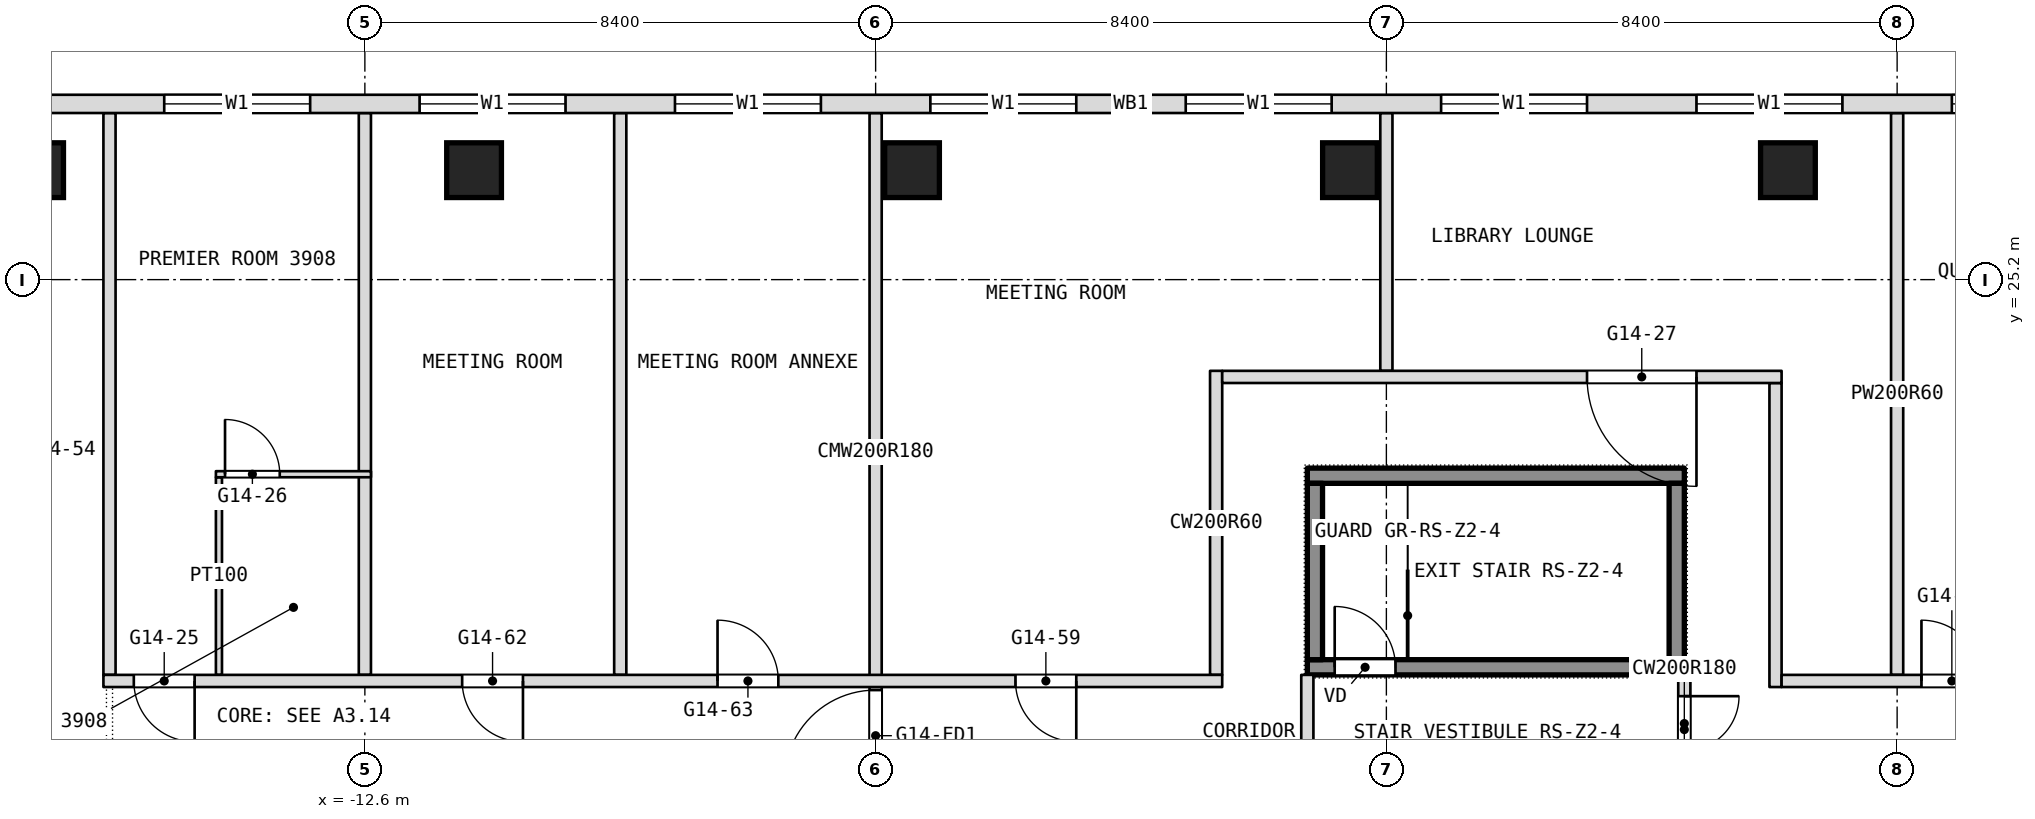
"""IFC4 building model, lengths in metres.
Left out: names, types, materials, properties, quantities, classifications, styles, units other than length and angle.
Written with IfcOpenShell. Run it as: python <this file> out.ifc"""

import sys

from ifc_helpers import new_model, si_unit, direction, frame, frame_2d, origin, origin_2d, place, context, subcontext, project, spatial, rectangle, extrude, element, fill, save


model = new_model("IFC4")
c1 = context("Model", 3, precision=1e-05, world=origin(), true_north=direction((0.0, 1.0)))
c2 = subcontext(c1, "Body", "Model", "MODEL_VIEW")
j1 = project(units=[si_unit("LENGTHUNIT", "METRE"), si_unit("PLANEANGLEUNIT", "RADIAN")], contexts=[c1])
p1 = place(None, origin())
s1 = spatial("IfcSite", under=j1, at=p1, CompositionType="ELEMENT")
p2 = place(p1, origin())
s2 = spatial("IfcBuilding", under=s1, at=p2, CompositionType="ELEMENT")
p3 = place(p2, frame((0.0, 0.0, 166.1)))
s3 = spatial("IfcBuildingStorey", under=s2, at=p3, CompositionType="ELEMENT", Elevation=166.1)
for number, where, z_axis, x_axis in (
    (1, (-18.007, 27.0, 0.0), (0.0, 0.0, 1.0), (1.0, 0.0, 0.0)),
    (2, (-10.804, 27.0, 0.0), (0.0, 0.0, 1.0), (1.0, 0.0, 0.0)),
    (3, (-3.601, 27.0, 0.0), (0.0, 0.0, 1.0), (1.0, 0.0, 0.0)),
    (4, (3.601, 27.0, 0.0), (0.0, 0.0, 1.0), (1.0, 0.0, 0.0)),
    (5, (10.804, 27.0, 0.0), (0.0, 0.0, 1.0), (1.0, 0.0, 0.0)),
):
    element("IfcColumn", number, at=place(p3, frame(where, z_axis=z_axis, x_axis=x_axis)), inside=s3, PredefinedType="COLUMN", context=c2, shape_type="SweptSolid", body=[
        extrude(rectangle(XDim=0.9, YDim=0.9, at=origin_2d()), origin(), (0.0, 0.0, 1.0), 3.6),
    ])
p4 = place(p3, frame((12.6, 18.7, 0.0), z_axis=(0.0, 0.0, 1.0), x_axis=(0.0, 1.0, 0.0)))
e6 = element("IfcWall", 6, at=p4, inside=s3, PredefinedType="PARTITIONING", context=c2, shape_type="SweptSolid", body=[
    extrude(rectangle(XDim=9.24, YDim=0.2, at=frame_2d((4.62, 0.0))), origin(), (0.0, 0.0, 1.0), 3.3),
])
p5 = place(p3, frame((10.6, 18.5, 0.0), z_axis=(0.0, 0.0, 1.0), x_axis=(0.0, 1.0, 0.0)))
e7 = element("IfcWall", 7, at=p5, inside=s3, PredefinedType="PARTITIONING", context=c2, shape_type="SweptSolid", body=[
    extrude(rectangle(XDim=5.0, YDim=0.2, at=frame_2d((2.5, 0.0))), origin(), (0.0, 0.0, 1.0), 3.3),
])
p6 = place(p3, frame((9.1, 16.9, 0.0), z_axis=(0.0, 0.0, 1.0), x_axis=(0.0, 1.0, 0.0)))
e8 = element("IfcWall", 8, at=p6, inside=s3, PredefinedType="PARTITIONING", context=c2, shape_type="SweptSolid", body=[
    extrude(rectangle(XDim=1.8, YDim=0.2, at=frame_2d((0.9, 0.0))), origin(), (0.0, 0.0, 1.0), 3.3),
])
p7 = place(p6, frame((0.55, 0.0, 0.0)))
e9 = element("IfcOpeningElement", 9, at=p7, cuts=e8, PredefinedType="OPENING", context=c2, shape_type="SweptSolid", body=[
    extrude(rectangle(XDim=0.9, YDim=2.1, at=frame_2d((0.45, 1.05))), frame((0.0, 0.1, 0.0), z_axis=(0.0, -1.0, 0.0), x_axis=(1.0, 0.0, 0.0)), (0.0, 0.0, 1.0), 0.2),
])
p8 = place(p3, frame((4.2, 23.7, 0.0), z_axis=(0.0, 0.0, 1.0), x_axis=(0.0, 1.0, 0.0)))
e10 = element("IfcWall", 10, at=p8, inside=s3, PredefinedType="PARTITIONING", context=c2, shape_type="SweptSolid", body=[
    extrude(rectangle(XDim=4.24, YDim=0.2, at=frame_2d((2.12, 0.0))), origin(), (0.0, 0.0, 1.0), 3.3),
])
p9 = place(p3, frame((2.9, 16.9, 0.0), z_axis=(0.0, 0.0, 1.0), x_axis=(0.0, 1.0, 0.0)))
e11 = element("IfcWall", 11, at=p9, inside=s3, PredefinedType="PARTITIONING", context=c2, shape_type="SweptSolid", body=[
    extrude(rectangle(XDim=1.8, YDim=0.2, at=frame_2d((0.9, 0.0))), origin(), (0.0, 0.0, 1.0), 3.3),
])
p10 = place(p3, frame((1.4, 18.7, 0.0), z_axis=(0.0, 0.0, 1.0), x_axis=(0.0, 1.0, 0.0)))
e12 = element("IfcWall", 12, at=p10, inside=s3, PredefinedType="PARTITIONING", context=c2, shape_type="SweptSolid", body=[
    extrude(rectangle(XDim=5.0, YDim=0.2, at=frame_2d((2.5, 0.0))), origin(), (0.0, 0.0, 1.0), 3.3),
])
p11 = place(p3, frame((-4.2, 16.8, 0.0), z_axis=(0.0, 0.0, 1.0), x_axis=(0.0, 1.0, 0.0)))
e13 = element("IfcWall", 13, at=p11, inside=s3, PredefinedType="PARTITIONING", context=c2, shape_type="SweptSolid", body=[
    extrude(rectangle(XDim=11.14, YDim=0.2, at=frame_2d((5.57, 0.0))), origin(), (0.0, 0.0, 1.0), 3.3),
])
p12 = place(p11, frame((0.15, 0.0, 0.0)))
e14 = element("IfcOpeningElement", 14, at=p12, cuts=e13, PredefinedType="OPENING", context=c2, shape_type="SweptSolid", body=[
    extrude(rectangle(XDim=1.5, YDim=2.1, at=frame_2d((0.75, 1.05))), frame((0.0, 0.1, 0.0), z_axis=(0.0, -1.0, 0.0), x_axis=(1.0, 0.0, 0.0)), (0.0, 0.0, 1.0), 0.2),
])
for number, where, z_axis, x_axis in (
    (15, (-8.4, 18.7, 0.0), (0.0, 0.0, 1.0), (0.0, 1.0, 0.0)),
    (16, (-12.6, 18.7, 0.0), (0.0, 0.0, 1.0), (0.0, 1.0, 0.0)),
):
    element("IfcWall", number, at=place(p3, frame(where, z_axis=z_axis, x_axis=x_axis)), inside=s3, PredefinedType="PARTITIONING", context=c2, shape_type="SweptSolid", body=[
        extrude(rectangle(XDim=9.24, YDim=0.2, at=frame_2d((4.62, 0.0))), origin(), (0.0, 0.0, 1.0), 3.3),
    ])
p13 = place(p3, frame((-15.0, 18.7, 0.0), z_axis=(0.0, 0.0, 1.0), x_axis=(0.0, 1.0, 0.0)))
e17 = element("IfcWall", 17, at=p13, inside=s3, PredefinedType="PARTITIONING", context=c2, shape_type="SweptSolid", body=[
    extrude(rectangle(XDim=3.25, YDim=0.1, at=frame_2d((1.625, 0.0))), origin(), (0.0, 0.0, 1.0), 3.3),
])
p14 = place(p3, frame((-16.8, 18.7, 0.0), z_axis=(0.0, 0.0, 1.0), x_axis=(0.0, 1.0, 0.0)))
e18 = element("IfcWall", 18, at=p14, inside=s3, PredefinedType="PARTITIONING", context=c2, shape_type="SweptSolid", body=[
    extrude(rectangle(XDim=9.24, YDim=0.2, at=frame_2d((4.62, 0.0))), origin(), (0.0, 0.0, 1.0), 3.3),
])
p15 = place(p3, frame((-16.9, 18.6, 0.0), z_axis=(0.0, 0.0, 1.0), x_axis=(1.0, 0.0, 0.0)))
e19 = element("IfcWall", 19, at=p15, inside=s3, PredefinedType="PARTITIONING", context=c2, shape_type="SweptSolid", body=[
    extrude(rectangle(XDim=18.4, YDim=0.2, at=frame_2d((9.2, 0.0))), origin(), (0.0, 0.0, 1.0), 3.3),
])
p16 = place(p15, frame((0.5, 0.0, 0.0)))
e20 = element("IfcOpeningElement", 20, at=p16, cuts=e19, PredefinedType="OPENING", context=c2, shape_type="SweptSolid", body=[
    extrude(rectangle(XDim=1.0, YDim=2.1, at=frame_2d((0.5, 1.05))), frame((0.0, 0.1, 0.0), z_axis=(0.0, -1.0, 0.0), x_axis=(1.0, 0.0, 0.0)), (0.0, 0.0, 1.0), 0.2),
])
p17 = place(p15, frame((15.0, 0.0, 0.0)))
e21 = element("IfcOpeningElement", 21, at=p17, cuts=e19, PredefinedType="OPENING", context=c2, shape_type="SweptSolid", body=[
    extrude(rectangle(XDim=1.0, YDim=2.1, at=frame_2d((0.5, 1.05))), frame((0.0, 0.1, 0.0), z_axis=(0.0, -1.0, 0.0), x_axis=(1.0, 0.0, 0.0)), (0.0, 0.0, 1.0), 0.2),
])
p18 = place(p15, frame((5.9, 0.0, 0.0)))
e22 = element("IfcOpeningElement", 22, at=p18, cuts=e19, PredefinedType="OPENING", context=c2, shape_type="SweptSolid", body=[
    extrude(rectangle(XDim=1.0, YDim=2.1, at=frame_2d((0.5, 1.05))), frame((0.0, 0.1, 0.0), z_axis=(0.0, -1.0, 0.0), x_axis=(1.0, 0.0, 0.0)), (0.0, 0.0, 1.0), 0.2),
])
p19 = place(p15, frame((10.1, 0.0, 0.0)))
e23 = element("IfcOpeningElement", 23, at=p19, cuts=e19, PredefinedType="OPENING", context=c2, shape_type="SweptSolid", body=[
    extrude(rectangle(XDim=1.0, YDim=2.1, at=frame_2d((0.5, 1.05))), frame((0.0, 0.1, 0.0), z_axis=(0.0, -1.0, 0.0), x_axis=(1.0, 0.0, 0.0)), (0.0, 0.0, 1.0), 0.2),
])
p20 = place(p3, frame((10.7, 18.6, 0.0), z_axis=(0.0, 0.0, 1.0), x_axis=(1.0, 0.0, 0.0)))
e24 = element("IfcWall", 24, at=p20, inside=s3, PredefinedType="PARTITIONING", context=c2, shape_type="SweptSolid", body=[
    extrude(rectangle(XDim=6.2, YDim=0.2, at=frame_2d((3.1, 0.0))), origin(), (0.0, 0.0, 1.0), 3.3),
])
p21 = place(p20, frame((2.3, 0.0, 0.0)))
e25 = element("IfcOpeningElement", 25, at=p21, cuts=e24, PredefinedType="OPENING", context=c2, shape_type="SweptSolid", body=[
    extrude(rectangle(XDim=1.0, YDim=2.1, at=frame_2d((0.5, 1.05))), frame((0.0, 0.1, 0.0), z_axis=(0.0, -1.0, 0.0), x_axis=(1.0, 0.0, 0.0)), (0.0, 0.0, 1.0), 0.2),
])
p22 = place(p3, frame((-15.05, 22.0, 0.0), z_axis=(0.0, 0.0, 1.0), x_axis=(1.0, 0.0, 0.0)))
e26 = element("IfcWall", 26, at=p22, inside=s3, PredefinedType="PARTITIONING", context=c2, shape_type="SweptSolid", body=[
    extrude(rectangle(XDim=2.55, YDim=0.1, at=frame_2d((1.275, 0.0))), origin(), (0.0, 0.0, 1.0), 3.3),
])
p23 = place(p22, frame((0.15, 0.0, 0.0)))
e27 = element("IfcOpeningElement", 27, at=p23, cuts=e26, PredefinedType="OPENING", context=c2, shape_type="SweptSolid", body=[
    extrude(rectangle(XDim=0.9, YDim=2.1, at=frame_2d((0.45, 1.05))), frame((0.0, 0.05, 0.0), z_axis=(0.0, -1.0, 0.0), x_axis=(1.0, 0.0, 0.0)), (0.0, 0.0, 1.0), 0.1),
])
p24 = place(p3, frame((1.5, 23.6, 0.0), z_axis=(0.0, 0.0, 1.0), x_axis=(1.0, 0.0, 0.0)))
e28 = element("IfcWall", 28, at=p24, inside=s3, PredefinedType="PARTITIONING", context=c2, shape_type="SweptSolid", body=[
    extrude(rectangle(XDim=9.2, YDim=0.2, at=frame_2d((4.6, 0.0))), origin(), (0.0, 0.0, 1.0), 3.3),
])
p25 = place(p24, frame((6.0, 0.0, 0.0)))
e29 = element("IfcOpeningElement", 29, at=p25, cuts=e28, PredefinedType="OPENING", context=c2, shape_type="SweptSolid", body=[
    extrude(rectangle(XDim=1.8, YDim=2.1, at=frame_2d((0.9, 1.05))), frame((0.0, 0.1, 0.0), z_axis=(0.0, -1.0, 0.0), x_axis=(1.0, 0.0, 0.0)), (0.0, 0.0, 1.0), 0.2),
])
p26 = place(p3, frame((21.306, 28.09, 0.0), z_axis=(0.0, 0.0, 1.0), x_axis=(-1.0, 0.0, 0.0)))
e30 = element("IfcWall", 30, at=p26, inside=s3, PredefinedType="NOTDEFINED", context=c2, shape_type="SweptSolid", body=[
    extrude(rectangle(XDim=42.612, YDim=0.3, at=frame_2d((21.306, 0.0))), origin(), (0.0, 0.0, 1.0), 3.6),
])
p27 = place(p26, frame((5.406, 0.0, 0.9)))
e31 = element("IfcOpeningElement", 31, at=p27, cuts=e30, PredefinedType="OPENING", context=c2, shape_type="SweptSolid", body=[
    extrude(rectangle(XDim=2.4, YDim=2.1, at=frame_2d((1.2, 1.05))), frame((0.0, 0.15, 0.0), z_axis=(0.0, -1.0, 0.0), x_axis=(1.0, 0.0, 0.0)), (0.0, 0.0, 1.0), 0.3),
])
p28 = place(p26, frame((9.606, 0.0, 0.9)))
e32 = element("IfcOpeningElement", 32, at=p28, cuts=e30, PredefinedType="OPENING", context=c2, shape_type="SweptSolid", body=[
    extrude(rectangle(XDim=2.4, YDim=2.1, at=frame_2d((1.2, 1.05))), frame((0.0, 0.15, 0.0), z_axis=(0.0, -1.0, 0.0), x_axis=(1.0, 0.0, 0.0)), (0.0, 0.0, 1.0), 0.3),
])
p29 = place(p26, frame((13.806, 0.0, 0.9)))
e33 = element("IfcOpeningElement", 33, at=p29, cuts=e30, PredefinedType="OPENING", context=c2, shape_type="SweptSolid", body=[
    extrude(rectangle(XDim=2.4, YDim=2.1, at=frame_2d((1.2, 1.05))), frame((0.0, 0.15, 0.0), z_axis=(0.0, -1.0, 0.0), x_axis=(1.0, 0.0, 0.0)), (0.0, 0.0, 1.0), 0.3),
])
p30 = place(p26, frame((18.006, 0.0, 0.9)))
e34 = element("IfcOpeningElement", 34, at=p30, cuts=e30, PredefinedType="OPENING", context=c2, shape_type="SweptSolid", body=[
    extrude(rectangle(XDim=2.4, YDim=2.1, at=frame_2d((1.2, 1.05))), frame((0.0, 0.15, 0.0), z_axis=(0.0, -1.0, 0.0), x_axis=(1.0, 0.0, 0.0)), (0.0, 0.0, 1.0), 0.3),
])
p31 = place(p26, frame((22.206, 0.0, 0.9)))
e35 = element("IfcOpeningElement", 35, at=p31, cuts=e30, PredefinedType="OPENING", context=c2, shape_type="SweptSolid", body=[
    extrude(rectangle(XDim=2.4, YDim=2.1, at=frame_2d((1.2, 1.05))), frame((0.0, 0.15, 0.0), z_axis=(0.0, -1.0, 0.0), x_axis=(1.0, 0.0, 0.0)), (0.0, 0.0, 1.0), 0.3),
])
p32 = place(p26, frame((26.406, 0.0, 0.9)))
e36 = element("IfcOpeningElement", 36, at=p32, cuts=e30, PredefinedType="OPENING", context=c2, shape_type="SweptSolid", body=[
    extrude(rectangle(XDim=2.4, YDim=2.1, at=frame_2d((1.2, 1.05))), frame((0.0, 0.15, 0.0), z_axis=(0.0, -1.0, 0.0), x_axis=(1.0, 0.0, 0.0)), (0.0, 0.0, 1.0), 0.3),
])
p33 = place(p26, frame((30.606, 0.0, 0.9)))
e37 = element("IfcOpeningElement", 37, at=p33, cuts=e30, PredefinedType="OPENING", context=c2, shape_type="SweptSolid", body=[
    extrude(rectangle(XDim=2.4, YDim=2.1, at=frame_2d((1.2, 1.05))), frame((0.0, 0.15, 0.0), z_axis=(0.0, -1.0, 0.0), x_axis=(1.0, 0.0, 0.0)), (0.0, 0.0, 1.0), 0.3),
])
p34 = place(p26, frame((34.806, 0.0, 0.9)))
e38 = element("IfcOpeningElement", 38, at=p34, cuts=e30, PredefinedType="OPENING", context=c2, shape_type="SweptSolid", body=[
    extrude(rectangle(XDim=2.4, YDim=2.1, at=frame_2d((1.2, 1.05))), frame((0.0, 0.15, 0.0), z_axis=(0.0, -1.0, 0.0), x_axis=(1.0, 0.0, 0.0)), (0.0, 0.0, 1.0), 0.3),
])
p35 = place(p3, frame((2.9, 18.825, 0.1), z_axis=(0.0, 0.0, 1.0), x_axis=(1.0, 0.0, 0.0)))
e39 = element("IfcWall", 39, at=p35, inside=s3, PredefinedType="SHEAR", context=c2, shape_type="SweptSolid", body=[
    extrude(rectangle(XDim=6.2, YDim=0.25, at=frame_2d((3.1, 0.0))), origin(), (0.0, 0.0, 1.0), 3.2),
])
p36 = place(p35, frame((0.45, 0.0, 0.0)))
e40 = element("IfcOpeningElement", 40, at=p36, cuts=e39, PredefinedType="OPENING", context=c2, shape_type="SweptSolid", body=[
    extrude(rectangle(XDim=1.0, YDim=2.1, at=frame_2d((0.5, 1.05))), frame((0.0, 0.125, 0.0), z_axis=(0.0, -1.0, 0.0), x_axis=(1.0, 0.0, 0.0)), (0.0, 0.0, 1.0), 0.25),
])
p37 = place(p3, frame((2.9, 21.975, 0.1), z_axis=(0.0, 0.0, 1.0), x_axis=(1.0, 0.0, 0.0)))
e41 = element("IfcWall", 41, at=p37, inside=s3, PredefinedType="SHEAR", context=c2, shape_type="SweptSolid", body=[
    extrude(rectangle(XDim=6.2, YDim=0.25, at=frame_2d((3.1, 0.0))), origin(), (0.0, 0.0, 1.0), 3.2),
])
for number, where, z_axis, x_axis in (
    (42, (3.025, 18.95, 0.1), (0.0, 0.0, 1.0), (0.0, 1.0, 0.0)),
    (43, (8.975, 18.95, 0.1), (0.0, 0.0, 1.0), (0.0, 1.0, 0.0)),
):
    element("IfcWall", number, at=place(p3, frame(where, z_axis=z_axis, x_axis=x_axis)), inside=s3, PredefinedType="SHEAR", context=c2, shape_type="SweptSolid", body=[
        extrude(rectangle(XDim=2.9, YDim=0.25, at=frame_2d((1.45, 0.0))), origin(), (0.0, 0.0, 1.0), 3.2),
    ])
p38 = place(p7, origin())
e44 = element("IfcDoor", 44, at=p38, inside=s3, OperationType="SINGLE_SWING_RIGHT", PredefinedType="DOOR", context=c2, shape_type="SweptSolid", body=[
    extrude(rectangle(XDim=0.9, YDim=2.1, at=frame_2d((0.45, 1.05))), frame((0.0, 0.025, 0.0), z_axis=(0.0, -1.0, 0.0), x_axis=(1.0, 0.0, 0.0)), (0.0, 0.0, 1.0), 0.05),
])
fill(e9, e44)
p39 = place(p16, origin())
e45 = element("IfcDoor", 45, at=p39, inside=s3, OperationType="SINGLE_SWING_RIGHT", PredefinedType="DOOR", context=c2, shape_type="SweptSolid", body=[
    extrude(rectangle(XDim=1.0, YDim=2.1, at=frame_2d((0.5, 1.05))), frame((0.0, 0.025, 0.0), z_axis=(0.0, -1.0, 0.0), x_axis=(1.0, 0.0, 0.0)), (0.0, 0.0, 1.0), 0.05),
])
fill(e20, e45)
p40 = place(p17, origin())
e46 = element("IfcDoor", 46, at=p40, inside=s3, OperationType="SINGLE_SWING_RIGHT", PredefinedType="DOOR", context=c2, shape_type="SweptSolid", body=[
    extrude(rectangle(XDim=1.0, YDim=2.1, at=frame_2d((0.5, 1.05))), frame((0.0, 0.025, 0.0), z_axis=(0.0, -1.0, 0.0), x_axis=(1.0, 0.0, 0.0)), (0.0, 0.0, 1.0), 0.05),
])
fill(e21, e46)
p41 = place(p18, origin())
e47 = element("IfcDoor", 47, at=p41, inside=s3, OperationType="SINGLE_SWING_LEFT", PredefinedType="DOOR", context=c2, shape_type="SweptSolid", body=[
    extrude(rectangle(XDim=1.0, YDim=2.1, at=frame_2d((0.5, 1.05))), frame((0.0, 0.025, 0.0), z_axis=(0.0, -1.0, 0.0), x_axis=(1.0, 0.0, 0.0)), (0.0, 0.0, 1.0), 0.05),
])
fill(e22, e47)
p42 = place(p19, origin())
e48 = element("IfcDoor", 48, at=p42, inside=s3, OperationType="SINGLE_SWING_RIGHT", PredefinedType="DOOR", context=c2, shape_type="SweptSolid", body=[
    extrude(rectangle(XDim=1.0, YDim=2.1, at=frame_2d((0.5, 1.05))), frame((0.0, 0.025, 0.0), z_axis=(0.0, -1.0, 0.0), x_axis=(1.0, 0.0, 0.0)), (0.0, 0.0, 1.0), 0.05),
])
fill(e23, e48)
p43 = place(p21, origin())
e49 = element("IfcDoor", 49, at=p43, inside=s3, OperationType="SINGLE_SWING_LEFT", PredefinedType="DOOR", context=c2, shape_type="SweptSolid", body=[
    extrude(rectangle(XDim=1.0, YDim=2.1, at=frame_2d((0.5, 1.05))), frame((0.0, 0.025, 0.0), z_axis=(0.0, -1.0, 0.0), x_axis=(1.0, 0.0, 0.0)), (0.0, 0.0, 1.0), 0.05),
])
fill(e25, e49)
p44 = place(p23, origin())
e50 = element("IfcDoor", 50, at=p44, inside=s3, OperationType="SINGLE_SWING_RIGHT", PredefinedType="DOOR", context=c2, shape_type="SweptSolid", body=[
    extrude(rectangle(XDim=0.9, YDim=2.1, at=frame_2d((0.45, 1.05))), frame((0.0, 0.025, 0.0), z_axis=(0.0, -1.0, 0.0), x_axis=(1.0, 0.0, 0.0)), (0.0, 0.0, 1.0), 0.05),
])
fill(e27, e50)
p45 = place(p25, origin())
e51 = element("IfcDoor", 51, at=p45, inside=s3, OperationType="DOUBLE_DOOR_SINGLE_SWING", PredefinedType="DOOR", context=c2, shape_type="SweptSolid", body=[
    extrude(rectangle(XDim=1.8, YDim=2.1, at=frame_2d((0.9, 1.05))), frame((0.0, 0.025, 0.0), z_axis=(0.0, -1.0, 0.0), x_axis=(1.0, 0.0, 0.0)), (0.0, 0.0, 1.0), 0.05),
])
fill(e29, e51)
p46 = place(p27, origin())
e52 = element("IfcWindow", 52, at=p46, inside=s3, PartitioningType="SINGLE_PANEL", PredefinedType="WINDOW", context=c2, shape_type="SweptSolid", body=[
    extrude(rectangle(XDim=2.4, YDim=2.1, at=frame_2d((1.2, 1.05))), frame((0.0, 0.03, 0.0), z_axis=(0.0, -1.0, 0.0), x_axis=(1.0, 0.0, 0.0)), (0.0, 0.0, 1.0), 0.06),
])
fill(e31, e52)
p47 = place(p28, origin())
e53 = element("IfcWindow", 53, at=p47, inside=s3, PartitioningType="SINGLE_PANEL", PredefinedType="WINDOW", context=c2, shape_type="SweptSolid", body=[
    extrude(rectangle(XDim=2.4, YDim=2.1, at=frame_2d((1.2, 1.05))), frame((0.0, 0.03, 0.0), z_axis=(0.0, -1.0, 0.0), x_axis=(1.0, 0.0, 0.0)), (0.0, 0.0, 1.0), 0.06),
])
fill(e32, e53)
p48 = place(p29, origin())
e54 = element("IfcWindow", 54, at=p48, inside=s3, PartitioningType="SINGLE_PANEL", PredefinedType="WINDOW", context=c2, shape_type="SweptSolid", body=[
    extrude(rectangle(XDim=2.4, YDim=2.1, at=frame_2d((1.2, 1.05))), frame((0.0, 0.03, 0.0), z_axis=(0.0, -1.0, 0.0), x_axis=(1.0, 0.0, 0.0)), (0.0, 0.0, 1.0), 0.06),
])
fill(e33, e54)
p49 = place(p30, origin())
e55 = element("IfcWindow", 55, at=p49, inside=s3, PartitioningType="SINGLE_PANEL", PredefinedType="WINDOW", context=c2, shape_type="SweptSolid", body=[
    extrude(rectangle(XDim=2.4, YDim=2.1, at=frame_2d((1.2, 1.05))), frame((0.0, 0.03, 0.0), z_axis=(0.0, -1.0, 0.0), x_axis=(1.0, 0.0, 0.0)), (0.0, 0.0, 1.0), 0.06),
])
fill(e34, e55)
p50 = place(p31, origin())
e56 = element("IfcWindow", 56, at=p50, inside=s3, PartitioningType="SINGLE_PANEL", PredefinedType="WINDOW", context=c2, shape_type="SweptSolid", body=[
    extrude(rectangle(XDim=2.4, YDim=2.1, at=frame_2d((1.2, 1.05))), frame((0.0, 0.03, 0.0), z_axis=(0.0, -1.0, 0.0), x_axis=(1.0, 0.0, 0.0)), (0.0, 0.0, 1.0), 0.06),
])
fill(e35, e56)
p51 = place(p32, origin())
e57 = element("IfcWindow", 57, at=p51, inside=s3, PartitioningType="SINGLE_PANEL", PredefinedType="WINDOW", context=c2, shape_type="SweptSolid", body=[
    extrude(rectangle(XDim=2.4, YDim=2.1, at=frame_2d((1.2, 1.05))), frame((0.0, 0.03, 0.0), z_axis=(0.0, -1.0, 0.0), x_axis=(1.0, 0.0, 0.0)), (0.0, 0.0, 1.0), 0.06),
])
fill(e36, e57)
p52 = place(p33, origin())
e58 = element("IfcWindow", 58, at=p52, inside=s3, PartitioningType="SINGLE_PANEL", PredefinedType="WINDOW", context=c2, shape_type="SweptSolid", body=[
    extrude(rectangle(XDim=2.4, YDim=2.1, at=frame_2d((1.2, 1.05))), frame((0.0, 0.03, 0.0), z_axis=(0.0, -1.0, 0.0), x_axis=(1.0, 0.0, 0.0)), (0.0, 0.0, 1.0), 0.06),
])
fill(e37, e58)
p53 = place(p34, origin())
e59 = element("IfcWindow", 59, at=p53, inside=s3, PartitioningType="SINGLE_PANEL", PredefinedType="WINDOW", context=c2, shape_type="SweptSolid", body=[
    extrude(rectangle(XDim=2.4, YDim=2.1, at=frame_2d((1.2, 1.05))), frame((0.0, 0.03, 0.0), z_axis=(0.0, -1.0, 0.0), x_axis=(1.0, 0.0, 0.0)), (0.0, 0.0, 1.0), 0.06),
])
fill(e38, e59)
p54 = place(p36, origin())
e60 = element("IfcDoor", 60, at=p54, inside=s3, OperationType="SINGLE_SWING_LEFT", PredefinedType="DOOR", context=c2, shape_type="SweptSolid", body=[
    extrude(rectangle(XDim=1.0, YDim=2.1, at=frame_2d((0.5, 1.05))), frame((0.0, 0.025, 0.0), z_axis=(0.0, -1.0, 0.0), x_axis=(1.0, 0.0, 0.0)), (0.0, 0.0, 1.0), 0.05),
])
fill(e40, e60)
p55 = place(p12, origin())
e61 = element("IfcDoor", 61, at=p55, inside=s3, OperationType="DOUBLE_DOOR_DOUBLE_SWING", PredefinedType="DOOR", context=c2, shape_type="SweptSolid", body=[
    extrude(rectangle(XDim=1.5, YDim=2.1, at=frame_2d((0.75, 1.05))), frame((0.0, 0.025, 0.0), z_axis=(0.0, -1.0, 0.0), x_axis=(1.0, 0.0, 0.0)), (0.0, 0.0, 1.0), 0.05),
])
fill(e14, e61)
save(model, sys.argv[1])
